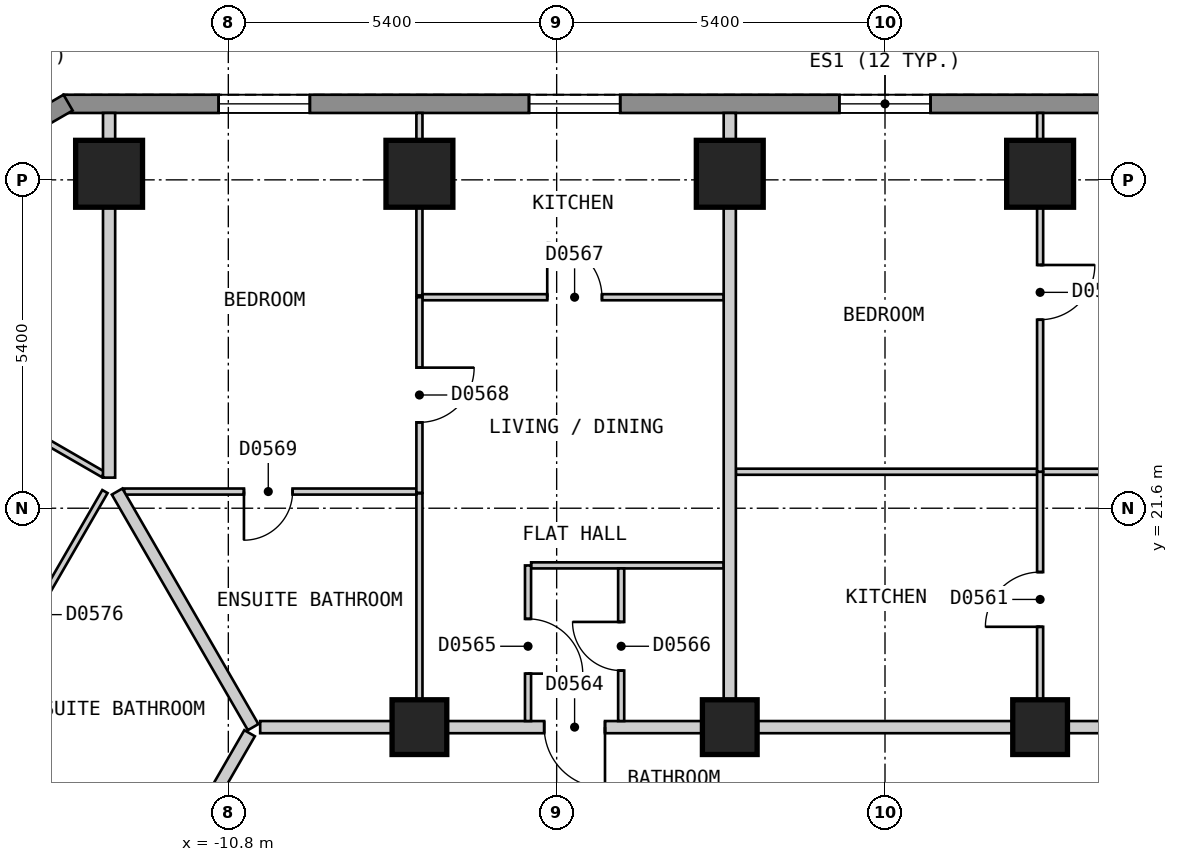
"""IFC4 building model, lengths in metres.
Left out: names, types, materials, properties, quantities, classifications, styles, units other than length and angle.
Written with IfcOpenShell. Run it as: python <this file> out.ifc"""

import sys

from ifc_helpers import new_model, si_unit, direction, frame, frame_2d, origin, origin_2d, place, context, subcontext, project, spatial, polyline, rectangle, outline, extrude, element, fill, save


model = new_model("IFC4")
c1 = context("Model", 3, precision=1e-05, world=origin(), true_north=direction((0.0, 1.0)))
c2 = subcontext(c1, "Body", "Model", "MODEL_VIEW")
j1 = project(units=[si_unit("LENGTHUNIT", "METRE"), si_unit("PLANEANGLEUNIT", "RADIAN")], contexts=[c1])
p1 = place(None, origin())
s1 = spatial("IfcSite", under=j1, at=p1, CompositionType="ELEMENT")
p2 = place(p1, origin())
s2 = spatial("IfcBuilding", under=s1, at=p2, CompositionType="ELEMENT")
p3 = place(p2, frame((0.0, 0.0, 50.4)))
s3 = spatial("IfcBuildingStorey", under=s2, at=p3, CompositionType="ELEMENT", Elevation=50.4)
for number, where, z_axis, x_axis in (
    (1, (2.551, 27.1, 0.0), (0.0, 0.0, 1.0), (-1.0, 0.0, 0.0)),
    (2, (-2.553, 27.1, 0.0), (0.0, 0.0, 1.0), (-1.0, 0.0, 0.0)),
    (3, (-7.657, 27.1, 0.0), (0.0, 0.0, 1.0), (-1.0, 0.0, 0.0)),
    (4, (-12.761, 27.1, 0.0), (0.0, 0.0, 1.0), (-1.0, 0.0, 0.0)),
):
    element("IfcColumn", number, at=place(p3, frame(where, z_axis=z_axis, x_axis=x_axis)), inside=s3, PredefinedType="COLUMN", context=c2, shape_type="SweptSolid", body=[
        extrude(rectangle(XDim=1.1, YDim=1.1, at=origin_2d()), origin(), (0.0, 0.0, 1.0), 3.0),
    ])
for number, where, z_axis, x_axis in (
    (5, (2.551, 18.0, 0.0), (0.0, 0.0, 1.0), (-1.0, 0.0, 0.0)),
    (6, (-2.553, 18.0, 0.0), (0.0, 0.0, 1.0), (-1.0, 0.0, 0.0)),
    (7, (-7.657, 18.0, 0.0), (0.0, 0.0, 1.0), (-1.0, 0.0, 0.0)),
):
    element("IfcColumn", number, at=place(p3, frame(where, z_axis=z_axis, x_axis=x_axis)), inside=s3, PredefinedType="COLUMN", context=c2, shape_type="SweptSolid", body=[
        extrude(rectangle(XDim=0.9, YDim=0.9, at=origin_2d()), origin(), (0.0, 0.0, 1.0), 3.0),
    ])
p4 = place(p3, frame((13.51, 28.25, 0.0), z_axis=(0.0, 0.0, 1.0), x_axis=(-1.0, 0.0, 0.0)))
e8 = element("IfcWall", 8, at=p4, inside=s3, PredefinedType="SOLIDWALL", context=c2, shape_type="SweptSolid", body=[
    extrude(outline(polyline([(0.0, -0.15), (27.02, -0.15), (26.94, 0.15), (0.08, 0.15), (0.0, -0.15)])), origin(), (0.0, 0.0, 1.0), 2.7),
])
p5 = place(p4, frame((2.553, 0.0, 0.15)))
e9 = element("IfcOpeningElement", 9, at=p5, cuts=e8, PredefinedType="OPENING", context=c2, shape_type="SweptSolid", body=[
    extrude(rectangle(XDim=1.5, YDim=2.1, at=frame_2d((0.75, 1.05))), frame((0.0, 0.16, 0.0), z_axis=(0.0, -1.0, 0.0), x_axis=(1.0, 0.0, 0.0)), (0.0, 0.0, 1.0), 0.32),
])
p6 = place(p4, frame((7.657, 0.0, 0.15)))
e10 = element("IfcOpeningElement", 10, at=p6, cuts=e8, PredefinedType="OPENING", context=c2, shape_type="SweptSolid", body=[
    extrude(rectangle(XDim=1.5, YDim=2.1, at=frame_2d((0.75, 1.05))), frame((0.0, 0.16, 0.0), z_axis=(0.0, -1.0, 0.0), x_axis=(1.0, 0.0, 0.0)), (0.0, 0.0, 1.0), 0.32),
])
p7 = place(p4, frame((12.761, 0.0, 0.15)))
e11 = element("IfcOpeningElement", 11, at=p7, cuts=e8, PredefinedType="OPENING", context=c2, shape_type="SweptSolid", body=[
    extrude(rectangle(XDim=1.5, YDim=2.1, at=frame_2d((0.75, 1.05))), frame((0.0, 0.16, 0.0), z_axis=(0.0, -1.0, 0.0), x_axis=(1.0, 0.0, 0.0)), (0.0, 0.0, 1.0), 0.32),
])
p8 = place(p4, frame((17.865, 0.0, 0.15)))
e12 = element("IfcOpeningElement", 12, at=p8, cuts=e8, PredefinedType="OPENING", context=c2, shape_type="SweptSolid", body=[
    extrude(rectangle(XDim=1.5, YDim=2.1, at=frame_2d((0.75, 1.05))), frame((0.0, 0.16, 0.0), z_axis=(0.0, -1.0, 0.0), x_axis=(1.0, 0.0, 0.0)), (0.0, 0.0, 1.0), 0.32),
])
p9 = place(p4, frame((22.969, 0.0, 0.15)))
e13 = element("IfcOpeningElement", 13, at=p9, cuts=e8, PredefinedType="OPENING", context=c2, shape_type="SweptSolid", body=[
    extrude(rectangle(XDim=1.5, YDim=2.1, at=frame_2d((0.75, 1.05))), frame((0.0, 0.16, 0.0), z_axis=(0.0, -1.0, 0.0), x_axis=(1.0, 0.0, 0.0)), (0.0, 0.0, 1.0), 0.32),
])
p10 = place(p3, frame((-13.435, 28.27, 0.0), z_axis=(0.0, 0.0, 1.0), x_axis=(-0.866010750942, -0.50002537861, 0.0)))
e14 = element("IfcWall", 14, at=p10, inside=s3, PredefinedType="SOLIDWALL", context=c2, shape_type="SweptSolid", body=[
    extrude(outline(polyline([(0.0, -0.15), (5.0, -0.15), (4.919, 0.15), (0.08, 0.15), (0.0, -0.15)])), origin(), (0.0, 0.0, 1.0), 2.7),
])
p11 = place(p10, frame((0.65, 0.0, 0.15)))
e15 = element("IfcOpeningElement", 15, at=p11, cuts=e14, PredefinedType="OPENING", context=c2, shape_type="SweptSolid", body=[
    extrude(rectangle(XDim=1.2, YDim=2.1, at=frame_2d((0.6, 1.05))), frame((0.0, 0.16, 0.0), z_axis=(0.0, -1.0, 0.0), x_axis=(1.0, 0.0, 0.0)), (0.0, 0.0, 1.0), 0.32),
])
p12 = place(p3, frame((-10.276, 18.0, 0.0), z_axis=(0.0, 0.0, 1.0), x_axis=(1.0, 0.0, 0.0)))
e16 = element("IfcWall", 16, at=p12, inside=s3, PredefinedType="PARTITIONING", context=c2, shape_type="SweptSolid", body=[
    extrude(rectangle(XDim=20.553, YDim=0.2, at=frame_2d((10.276, 0.0))), origin(), (0.0, 0.0, 1.0), 2.7),
])
p13 = place(p12, frame((14.879, 0.0, 0.0)))
e17 = element("IfcOpeningElement", 17, at=p13, cuts=e16, PredefinedType="OPENING", context=c2, shape_type="SweptSolid", body=[
    extrude(rectangle(XDim=1.0, YDim=2.1, at=frame_2d((0.5, 1.05))), frame((0.0, 0.11, 0.0), z_axis=(0.0, -1.0, 0.0), x_axis=(1.0, 0.0, 0.0)), (0.0, 0.0, 1.0), 0.22),
])
p14 = place(p12, frame((4.671, 0.0, 0.0)))
e18 = element("IfcOpeningElement", 18, at=p14, cuts=e16, PredefinedType="OPENING", context=c2, shape_type="SweptSolid", body=[
    extrude(rectangle(XDim=1.0, YDim=2.1, at=frame_2d((0.5, 1.05))), frame((0.0, 0.11, 0.0), z_axis=(0.0, -1.0, 0.0), x_axis=(1.0, 0.0, 0.0)), (0.0, 0.0, 1.0), 0.22),
])
p15 = place(p3, frame((-20.727, 0.099, 0.0), z_axis=(0.0, 0.0, 1.0), x_axis=(0.499993204491, 0.866029327138, 0.0)))
e19 = element("IfcWall", 19, at=p15, inside=s3, PredefinedType="PARTITIONING", context=c2, shape_type="SweptSolid", body=[
    extrude(rectangle(XDim=20.554, YDim=0.2, at=frame_2d((10.277, 0.0))), origin(), (0.0, 0.0, 1.0), 2.7),
])
p16 = place(p15, frame((9.776, 0.0, 0.0)))
e20 = element("IfcOpeningElement", 20, at=p16, cuts=e19, PredefinedType="OPENING", context=c2, shape_type="SweptSolid", body=[
    extrude(rectangle(XDim=1.0, YDim=2.1, at=frame_2d((0.5, 1.05))), frame((0.0, 0.11, 0.0), z_axis=(0.0, -1.0, 0.0), x_axis=(1.0, 0.0, 0.0)), (0.0, 0.0, 1.0), 0.22),
])
p17 = place(p15, frame((4.673, 0.0, 0.0)))
e21 = element("IfcOpeningElement", 21, at=p17, cuts=e19, PredefinedType="OPENING", context=c2, shape_type="SweptSolid", body=[
    extrude(rectangle(XDim=1.0, YDim=2.1, at=frame_2d((0.5, 1.05))), frame((0.0, 0.11, 0.0), z_axis=(0.0, -1.0, 0.0), x_axis=(1.0, 0.0, 0.0)), (0.0, 0.0, 1.0), 0.22),
])
p18 = place(p15, frame((14.88, 0.0, 0.0)))
e22 = element("IfcOpeningElement", 22, at=p18, cuts=e19, PredefinedType="OPENING", context=c2, shape_type="SweptSolid", body=[
    extrude(rectangle(XDim=1.0, YDim=2.1, at=frame_2d((0.5, 1.05))), frame((0.0, 0.11, 0.0), z_axis=(0.0, -1.0, 0.0), x_axis=(1.0, 0.0, 0.0)), (0.0, 0.0, 1.0), 0.22),
])
p19 = place(p3, frame((-7.657, 28.1, 0.0), z_axis=(0.0, 0.0, 1.0), x_axis=(0.0, -1.0, 0.0)))
e23 = element("IfcWall", 23, at=p19, inside=s3, PredefinedType="PARTITIONING", context=c2, shape_type="SweptSolid", body=[
    extrude(rectangle(XDim=3.0, YDim=0.1, at=frame_2d((1.5, 0.0))), origin(), (0.0, 0.0, 1.0), 2.7),
])
p20 = place(p3, frame((-7.657, 21.844, 0.0), z_axis=(0.0, 0.0, 1.0), x_axis=(0.0, -1.0, 0.0)))
e24 = element("IfcWall", 24, at=p20, inside=s3, PredefinedType="PARTITIONING", context=c2, shape_type="SweptSolid", body=[
    extrude(rectangle(XDim=3.744, YDim=0.1, at=frame_2d((1.872, 0.0))), origin(), (0.0, 0.0, 1.0), 2.7),
])
p21 = place(p3, frame((-20.508, 20.679, 0.0), z_axis=(0.0, 0.0, 1.0), x_axis=(0.866047370643, -0.499961950354, 0.0)))
e25 = element("IfcWall", 25, at=p21, inside=s3, PredefinedType="PARTITIONING", context=c2, shape_type="SweptSolid", body=[
    extrude(rectangle(XDim=10.001, YDim=0.1, at=frame_2d((5.0, 0.0))), origin(), (0.0, 0.0, 1.0), 2.7),
])
p22 = place(p21, frame((2.576, 0.0, 0.0)))
e26 = element("IfcOpeningElement", 26, at=p22, cuts=e25, PredefinedType="OPENING", context=c2, shape_type="SweptSolid", body=[
    extrude(rectangle(XDim=0.9, YDim=2.1, at=frame_2d((0.45, 1.05))), frame((0.0, 0.06, 0.0), z_axis=(0.0, -1.0, 0.0), x_axis=(1.0, 0.0, 0.0)), (0.0, 0.0, 1.0), 0.12),
])
p23 = place(p3, frame((-17.955, 25.099, 0.0), z_axis=(0.0, 0.0, 1.0), x_axis=(0.866036353684, -0.499981033738, 0.0)))
e27 = element("IfcWall", 27, at=p23, inside=s3, PredefinedType="PARTITIONING", context=c2, shape_type="SweptSolid", body=[
    extrude(rectangle(XDim=5.885, YDim=0.1, at=frame_2d((2.942, 0.0))), origin(), (0.0, 0.0, 1.0), 2.7),
])
p24 = place(p23, frame((2.55, 0.0, 0.0)))
e28 = element("IfcOpeningElement", 28, at=p24, cuts=e27, PredefinedType="OPENING", context=c2, shape_type="SweptSolid", body=[
    extrude(rectangle(XDim=0.9, YDim=2.1, at=frame_2d((0.45, 1.05))), frame((0.0, 0.06, 0.0), z_axis=(0.0, -1.0, 0.0), x_axis=(1.0, 0.0, 0.0)), (0.0, 0.0, 1.0), 0.12),
])
p25 = place(p3, frame((-5.82, 20.66, 0.0), z_axis=(0.0, 0.0, 1.0), x_axis=(1.0, 0.0, 0.0)))
e29 = element("IfcWall", 29, at=p25, inside=s3, PredefinedType="PARTITIONING", context=c2, shape_type="SweptSolid", body=[
    extrude(rectangle(XDim=3.167, YDim=0.1, at=frame_2d((1.583, 0.0))), origin(), (0.0, 0.0, 1.0), 2.7),
])
p26 = place(p3, frame((-12.513, 21.874, 0.0), z_axis=(0.0, 0.0, 1.0), x_axis=(1.0, 0.0, 0.0)))
e30 = element("IfcWall", 30, at=p26, inside=s3, PredefinedType="PARTITIONING", context=c2, shape_type="SweptSolid", body=[
    extrude(rectangle(XDim=4.806, YDim=0.1, at=frame_2d((2.403, 0.0))), origin(), (0.0, 0.0, 1.0), 2.7),
])
p27 = place(p26, frame((1.97, 0.0, 0.0)))
e31 = element("IfcOpeningElement", 31, at=p27, cuts=e30, PredefinedType="OPENING", context=c2, shape_type="SweptSolid", body=[
    extrude(rectangle(XDim=0.8, YDim=2.1, at=frame_2d((0.4, 1.05))), frame((0.0, 0.06, 0.0), z_axis=(0.0, -1.0, 0.0), x_axis=(1.0, 0.0, 0.0)), (0.0, 0.0, 1.0), 0.12),
])
p28 = place(p3, frame((-2.453, 22.2, 0.0), z_axis=(0.0, 0.0, 1.0), x_axis=(1.0, 0.0, 0.0)))
e32 = element("IfcWall", 32, at=p28, inside=s3, PredefinedType="PARTITIONING", context=c2, shape_type="SweptSolid", body=[
    extrude(rectangle(XDim=15.155, YDim=0.1, at=frame_2d((7.577, 0.0))), origin(), (0.0, 0.0, 1.0), 2.7),
])
p29 = place(p28, frame((7.106, 0.0, 0.0)))
e33 = element("IfcOpeningElement", 33, at=p29, cuts=e32, PredefinedType="OPENING", context=c2, shape_type="SweptSolid", body=[
    extrude(rectangle(XDim=0.9, YDim=2.1, at=frame_2d((0.45, 1.05))), frame((0.0, 0.06, 0.0), z_axis=(0.0, -1.0, 0.0), x_axis=(1.0, 0.0, 0.0)), (0.0, 0.0, 1.0), 0.12),
])
p30 = place(p3, frame((-7.607, 25.07, 0.0), z_axis=(0.0, 0.0, 1.0), x_axis=(1.0, 0.0, 0.0)))
e34 = element("IfcWall", 34, at=p30, inside=s3, PredefinedType="PARTITIONING", context=c2, shape_type="SweptSolid", body=[
    extrude(rectangle(XDim=4.954, YDim=0.1, at=frame_2d((2.477, 0.0))), origin(), (0.0, 0.0, 1.0), 2.7),
])
p31 = place(p30, frame((2.052, 0.0, 0.0)))
e35 = element("IfcOpeningElement", 35, at=p31, cuts=e34, PredefinedType="OPENING", context=c2, shape_type="SweptSolid", body=[
    extrude(rectangle(XDim=0.9, YDim=2.1, at=frame_2d((0.45, 1.05))), frame((0.0, 0.06, 0.0), z_axis=(0.0, -1.0, 0.0), x_axis=(1.0, 0.0, 0.0)), (0.0, 0.0, 1.0), 0.12),
])
p32 = place(p3, frame((2.551, 18.1, 0.0), z_axis=(0.0, 0.0, 1.0), x_axis=(0.0, 1.0, 0.0)))
e36 = element("IfcWall", 36, at=p32, inside=s3, PredefinedType="PARTITIONING", context=c2, shape_type="SweptSolid", body=[
    extrude(rectangle(XDim=4.1, YDim=0.1, at=frame_2d((2.05, 0.0))), origin(), (0.0, 0.0, 1.0), 2.7),
])
p33 = place(p32, frame((1.55, 0.0, 0.0)))
e37 = element("IfcOpeningElement", 37, at=p33, cuts=e36, PredefinedType="OPENING", context=c2, shape_type="SweptSolid", body=[
    extrude(rectangle(XDim=0.9, YDim=2.1, at=frame_2d((0.45, 1.05))), frame((0.0, 0.06, 0.0), z_axis=(0.0, -1.0, 0.0), x_axis=(1.0, 0.0, 0.0)), (0.0, 0.0, 1.0), 0.12),
])
p34 = place(p3, frame((-4.339, 18.1, 0.0), z_axis=(0.0, 0.0, 1.0), x_axis=(0.0, 1.0, 0.0)))
e38 = element("IfcWall", 38, at=p34, inside=s3, PredefinedType="PARTITIONING", context=c2, shape_type="SweptSolid", body=[
    extrude(rectangle(XDim=2.51, YDim=0.1, at=frame_2d((1.255, 0.0))), origin(), (0.0, 0.0, 1.0), 2.7),
])
p35 = place(p34, frame((0.83, 0.0, 0.0)))
e39 = element("IfcOpeningElement", 39, at=p35, cuts=e38, PredefinedType="OPENING", context=c2, shape_type="SweptSolid", body=[
    extrude(rectangle(XDim=0.8, YDim=2.1, at=frame_2d((0.4, 1.05))), frame((0.0, 0.06, 0.0), z_axis=(0.0, -1.0, 0.0), x_axis=(1.0, 0.0, 0.0)), (0.0, 0.0, 1.0), 0.12),
])
p36 = place(p3, frame((-5.871, 18.1, 0.0), z_axis=(0.0, 0.0, 1.0), x_axis=(0.0, 1.0, 0.0)))
e40 = element("IfcWall", 40, at=p36, inside=s3, PredefinedType="PARTITIONING", context=c2, shape_type="SweptSolid", body=[
    extrude(rectangle(XDim=2.559, YDim=0.1, at=frame_2d((1.279, 0.0))), origin(), (0.0, 0.0, 1.0), 2.7),
])
p37 = place(p36, frame((0.78, 0.0, 0.0)))
e41 = element("IfcOpeningElement", 41, at=p37, cuts=e40, PredefinedType="OPENING", context=c2, shape_type="SweptSolid", body=[
    extrude(rectangle(XDim=0.9, YDim=2.1, at=frame_2d((0.45, 1.05))), frame((0.0, 0.06, 0.0), z_axis=(0.0, -1.0, 0.0), x_axis=(1.0, 0.0, 0.0)), (0.0, 0.0, 1.0), 0.12),
])
p38 = place(p3, frame((-7.657, 21.854, 0.0), z_axis=(0.0, 0.0, 1.0), x_axis=(0.0, 1.0, 0.0)))
e42 = element("IfcWall", 42, at=p38, inside=s3, PredefinedType="PARTITIONING", context=c2, shape_type="SweptSolid", body=[
    extrude(rectangle(XDim=3.216, YDim=0.1, at=frame_2d((1.608, 0.0))), origin(), (0.0, 0.0, 1.0), 2.7),
])
p39 = place(p38, frame((1.158, 0.0, 0.0)))
e43 = element("IfcOpeningElement", 43, at=p39, cuts=e42, PredefinedType="OPENING", context=c2, shape_type="SweptSolid", body=[
    extrude(rectangle(XDim=0.9, YDim=2.1, at=frame_2d((0.45, 1.05))), frame((0.0, 0.06, 0.0), z_axis=(0.0, -1.0, 0.0), x_axis=(1.0, 0.0, 0.0)), (0.0, 0.0, 1.0), 0.12),
])
p40 = place(p3, frame((-12.629, 21.874, 0.0), z_axis=(0.0, 0.0, 1.0), x_axis=(0.500024801635, -0.86601108408, 0.0)))
e44 = element("IfcWall", 44, at=p40, inside=s3, PredefinedType="PARTITIONING", context=c2, shape_type="SweptSolid", body=[
    extrude(rectangle(XDim=4.473, YDim=0.2, at=frame_2d((2.237, 0.0))), origin(), (0.0, 0.0, 1.0), 2.7),
])
p41 = place(p3, frame((-12.761, 22.103, 0.0), z_axis=(0.0, 0.0, 1.0), x_axis=(0.0, 1.0, 0.0)))
e45 = element("IfcWall", 45, at=p41, inside=s3, PredefinedType="PARTITIONING", context=c2, shape_type="SweptSolid", body=[
    extrude(rectangle(XDim=5.997, YDim=0.2, at=frame_2d((2.999, 0.0))), origin(), (0.0, 0.0, 1.0), 2.7),
])
p42 = place(p3, frame((-2.553, 18.1, 0.0), z_axis=(0.0, 0.0, 1.0), x_axis=(0.0, 1.0, 0.0)))
e46 = element("IfcWall", 46, at=p42, inside=s3, PredefinedType="PARTITIONING", context=c2, shape_type="SweptSolid", body=[
    extrude(rectangle(XDim=10.0, YDim=0.2, at=frame_2d((5.0, 0.0))), origin(), (0.0, 0.0, 1.0), 2.7),
])
p43 = place(p3, frame((-15.266, 17.653, 0.0), z_axis=(0.0, 0.0, 1.0), x_axis=(0.500007182864, 0.866021256716, 0.0)))
e47 = element("IfcWall", 47, at=p43, inside=s3, PredefinedType="PARTITIONING", context=c2, shape_type="SweptSolid", body=[
    extrude(rectangle(XDim=4.874, YDim=0.1, at=frame_2d((2.437, 0.0))), origin(), (0.0, 0.0, 1.0), 2.7),
])
p44 = place(p43, frame((2.137, 0.0, 0.0)))
e48 = element("IfcOpeningElement", 48, at=p44, cuts=e47, PredefinedType="OPENING", context=c2, shape_type="SweptSolid", body=[
    extrude(rectangle(XDim=0.8, YDim=2.1, at=frame_2d((0.4, 1.05))), frame((0.0, 0.06, 0.0), z_axis=(0.0, -1.0, 0.0), x_axis=(1.0, 0.0, 0.0)), (0.0, 0.0, 1.0), 0.12),
])
p45 = place(p3, frame((2.551, 22.2, 0.0), z_axis=(0.0, 0.0, 1.0), x_axis=(0.0, 1.0, 0.0)))
e49 = element("IfcWall", 49, at=p45, inside=s3, PredefinedType="PARTITIONING", context=c2, shape_type="SweptSolid", body=[
    extrude(rectangle(XDim=5.9, YDim=0.1, at=frame_2d((2.95, 0.0))), origin(), (0.0, 0.0, 1.0), 2.7),
])
p46 = place(p45, frame((2.5, 0.0, 0.0)))
e50 = element("IfcOpeningElement", 50, at=p46, cuts=e49, PredefinedType="OPENING", context=c2, shape_type="SweptSolid", body=[
    extrude(rectangle(XDim=0.9, YDim=2.1, at=frame_2d((0.45, 1.05))), frame((0.0, 0.06, 0.0), z_axis=(0.0, -1.0, 0.0), x_axis=(1.0, 0.0, 0.0)), (0.0, 0.0, 1.0), 0.12),
])
p47 = place(p7, origin())
e51 = element("IfcWindow", 51, at=p47, inside=s3, PartitioningType="SINGLE_PANEL", PredefinedType="WINDOW", context=c2, shape_type="SweptSolid", body=[
    extrude(rectangle(XDim=1.5, YDim=2.1, at=frame_2d((0.75, 1.05))), frame((0.0, 0.03, 0.0), z_axis=(0.0, -1.0, 0.0), x_axis=(1.0, 0.0, 0.0)), (0.0, 0.0, 1.0), 0.06),
])
fill(e11, e51)
p48 = place(p8, origin())
e52 = element("IfcWindow", 52, at=p48, inside=s3, PartitioningType="SINGLE_PANEL", PredefinedType="WINDOW", context=c2, shape_type="SweptSolid", body=[
    extrude(rectangle(XDim=1.5, YDim=2.1, at=frame_2d((0.75, 1.05))), frame((0.0, 0.03, 0.0), z_axis=(0.0, -1.0, 0.0), x_axis=(1.0, 0.0, 0.0)), (0.0, 0.0, 1.0), 0.06),
])
fill(e12, e52)
p49 = place(p9, origin())
e53 = element("IfcWindow", 53, at=p49, inside=s3, PartitioningType="SINGLE_PANEL", PredefinedType="WINDOW", context=c2, shape_type="SweptSolid", body=[
    extrude(rectangle(XDim=1.5, YDim=2.1, at=frame_2d((0.75, 1.05))), frame((0.0, 0.03, 0.0), z_axis=(0.0, -1.0, 0.0), x_axis=(1.0, 0.0, 0.0)), (0.0, 0.0, 1.0), 0.06),
])
fill(e13, e53)
p50 = place(p33, origin())
e54 = element("IfcDoor", 54, at=p50, inside=s3, OperationType="SINGLE_SWING_LEFT", PredefinedType="DOOR", context=c2, shape_type="SweptSolid", body=[
    extrude(rectangle(XDim=0.9, YDim=2.1, at=frame_2d((0.45, 1.05))), frame((0.0, 0.025, 0.0), z_axis=(0.0, -1.0, 0.0), x_axis=(1.0, 0.0, 0.0)), (0.0, 0.0, 1.0), 0.05),
])
fill(e37, e54)
p51 = place(p46, origin())
e55 = element("IfcDoor", 55, at=p51, inside=s3, OperationType="SINGLE_SWING_RIGHT", PredefinedType="DOOR", context=c2, shape_type="SweptSolid", body=[
    extrude(rectangle(XDim=0.9, YDim=2.1, at=frame_2d((0.45, 1.05))), frame((0.0, 0.025, 0.0), z_axis=(0.0, -1.0, 0.0), x_axis=(1.0, 0.0, 0.0)), (0.0, 0.0, 1.0), 0.05),
])
fill(e50, e55)
p52 = place(p14, origin())
e56 = element("IfcDoor", 56, at=p52, inside=s3, OperationType="SINGLE_SWING_RIGHT", PredefinedType="DOOR", context=c2, shape_type="SweptSolid", body=[
    extrude(rectangle(XDim=1.0, YDim=2.1, at=frame_2d((0.5, 1.05))), frame((0.0, 0.025, 0.0), z_axis=(0.0, -1.0, 0.0), x_axis=(1.0, 0.0, 0.0)), (0.0, 0.0, 1.0), 0.05),
])
fill(e18, e56)
p53 = place(p37, origin())
e57 = element("IfcDoor", 57, at=p53, inside=s3, OperationType="SINGLE_SWING_LEFT", PredefinedType="DOOR", context=c2, shape_type="SweptSolid", body=[
    extrude(rectangle(XDim=0.9, YDim=2.1, at=frame_2d((0.45, 1.05))), frame((0.0, 0.025, 0.0), z_axis=(0.0, -1.0, 0.0), x_axis=(1.0, 0.0, 0.0)), (0.0, 0.0, 1.0), 0.05),
])
fill(e41, e57)
p54 = place(p35, origin())
e58 = element("IfcDoor", 58, at=p54, inside=s3, OperationType="SINGLE_SWING_RIGHT", PredefinedType="DOOR", context=c2, shape_type="SweptSolid", body=[
    extrude(rectangle(XDim=0.8, YDim=2.1, at=frame_2d((0.4, 1.05))), frame((0.0, 0.025, 0.0), z_axis=(0.0, -1.0, 0.0), x_axis=(1.0, 0.0, 0.0)), (0.0, 0.0, 1.0), 0.05),
])
fill(e39, e58)
p55 = place(p31, origin())
e59 = element("IfcDoor", 59, at=p55, inside=s3, OperationType="SINGLE_SWING_LEFT", PredefinedType="DOOR", context=c2, shape_type="SweptSolid", body=[
    extrude(rectangle(XDim=0.9, YDim=2.1, at=frame_2d((0.45, 1.05))), frame((0.0, 0.025, 0.0), z_axis=(0.0, -1.0, 0.0), x_axis=(1.0, 0.0, 0.0)), (0.0, 0.0, 1.0), 0.05),
])
fill(e35, e59)
p56 = place(p39, origin())
e60 = element("IfcDoor", 60, at=p56, inside=s3, OperationType="SINGLE_SWING_RIGHT", PredefinedType="DOOR", context=c2, shape_type="SweptSolid", body=[
    extrude(rectangle(XDim=0.9, YDim=2.1, at=frame_2d((0.45, 1.05))), frame((0.0, 0.025, 0.0), z_axis=(0.0, -1.0, 0.0), x_axis=(1.0, 0.0, 0.0)), (0.0, 0.0, 1.0), 0.05),
])
fill(e43, e60)
p57 = place(p27, origin())
e61 = element("IfcDoor", 61, at=p57, inside=s3, OperationType="SINGLE_SWING_LEFT", PredefinedType="DOOR", context=c2, shape_type="SweptSolid", body=[
    extrude(rectangle(XDim=0.8, YDim=2.1, at=frame_2d((0.4, 1.05))), frame((0.0, 0.025, 0.0), z_axis=(0.0, -1.0, 0.0), x_axis=(1.0, 0.0, 0.0)), (0.0, 0.0, 1.0), 0.05),
])
fill(e31, e61)
save(model, sys.argv[1])
